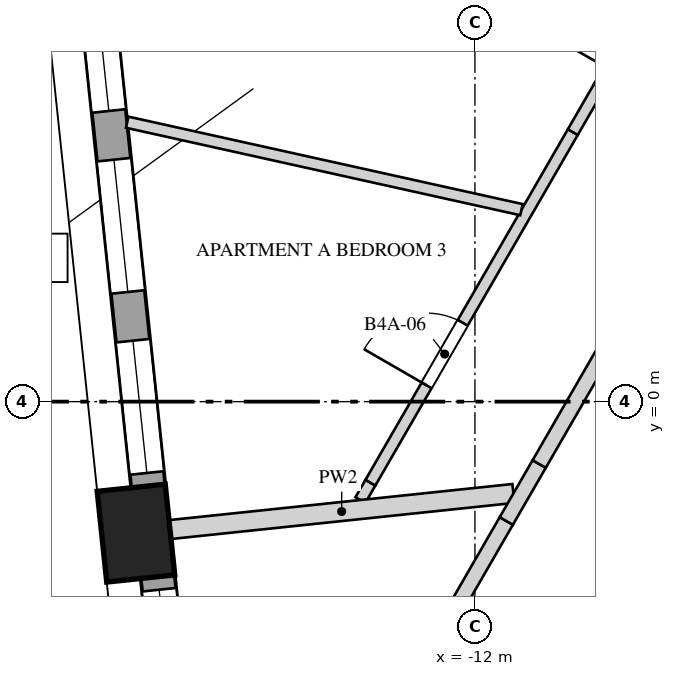
"""IFC4 building model, lengths in metres.
Left out: names, types, materials, properties, quantities, classifications, styles, units other than length and angle.
Written with IfcOpenShell. Run it as: python <this file> out.ifc"""

import sys

from ifc_helpers import new_model, si_unit, direction, frame, frame_2d, origin, origin_2d, place, context, subcontext, project, spatial, rectangle, extrude, element, fill, save


model = new_model("IFC4")
c1 = context("Model", 3, precision=1e-05, world=origin(), true_north=direction((0.0, 1.0)))
c2 = subcontext(c1, "Body", "Model", "MODEL_VIEW")
j1 = project(units=[si_unit("LENGTHUNIT", "METRE"), si_unit("PLANEANGLEUNIT", "RADIAN")], contexts=[c1])
p1 = place(None, origin())
s1 = spatial("IfcSite", under=j1, at=p1, CompositionType="ELEMENT")
p2 = place(p1, origin())
s2 = spatial("IfcBuilding", under=s1, at=p2, CompositionType="ELEMENT")
p3 = place(p2, frame((0.0, 0.0, 162.8)))
s3 = spatial("IfcBuildingStorey", under=s2, at=p3, CompositionType="ELEMENT", Elevation=162.8)
p4 = place(p3, frame((-16.459, -1.73, -0.35), z_axis=(0.0, 0.0, 1.0), x_axis=(0.104528463268, -0.994521895368, 0.0)))
e1 = element("IfcColumn", 1, at=p4, inside=s3, PredefinedType="COLUMN", context=c2, shape_type="SweptSolid", body=[
    extrude(rectangle(XDim=1.2, YDim=0.9, at=origin_2d()), origin(), (0.0, 0.0, 1.0), 4.35),
])
p5 = place(p3, frame((-17.018, 5.736, 0.0), z_axis=(0.0, 0.0, 1.0), x_axis=(0.104531531326, -0.994521572898, 0.0)))
e2 = element("IfcWall", 2, at=p5, inside=s3, PredefinedType="SOLIDWALL", context=c2, shape_type="SweptSolid", body=[
    extrude(rectangle(XDim=6.883, YDim=0.45, at=frame_2d((3.441, 0.0))), origin(), (0.0, 0.0, 1.0), 3.3),
])
p6 = place(p5, frame((0.172, 0.0, 0.5)))
e3 = element("IfcOpeningElement", 3, at=p6, cuts=e2, PredefinedType="OPENING", context=c2, shape_type="SweptSolid", body=[
    extrude(rectangle(XDim=1.75, YDim=2.65, at=frame_2d((0.875, 1.325))), frame((0.0, 0.235, 0.0), z_axis=(0.0, -1.0, 0.0), x_axis=(1.0, 0.0, 0.0)), (0.0, 0.0, 1.0), 0.47),
])
p7 = place(p5, frame((2.566, 0.0, 0.5)))
e4 = element("IfcOpeningElement", 4, at=p7, cuts=e2, PredefinedType="OPENING", context=c2, shape_type="SweptSolid", body=[
    extrude(rectangle(XDim=1.75, YDim=2.65, at=frame_2d((0.875, 1.325))), frame((0.0, 0.235, 0.0), z_axis=(0.0, -1.0, 0.0), x_axis=(1.0, 0.0, 0.0)), (0.0, 0.0, 1.0), 0.47),
])
p8 = place(p5, frame((4.961, 0.0, 0.5)))
e5 = element("IfcOpeningElement", 5, at=p8, cuts=e2, PredefinedType="OPENING", context=c2, shape_type="SweptSolid", body=[
    extrude(rectangle(XDim=1.75, YDim=2.65, at=frame_2d((0.875, 1.325))), frame((0.0, 0.235, 0.0), z_axis=(0.0, -1.0, 0.0), x_axis=(1.0, 0.0, 0.0)), (0.0, 0.0, 1.0), 0.47),
])
p9 = place(p3, frame((-16.173, -2.303, 0.0), z_axis=(0.0, 0.0, 1.0), x_axis=(0.104569484464, -0.994517583011, 0.0)))
e6 = element("IfcWall", 6, at=p9, inside=s3, PredefinedType="SOLIDWALL", context=c2, shape_type="SweptSolid", body=[
    extrude(rectangle(XDim=2.094, YDim=0.45, at=frame_2d((1.047, 0.0))), origin(), (0.0, 0.0, 1.0), 3.3),
])
p10 = place(p9, frame((0.172, 0.0, 0.5)))
e7 = element("IfcOpeningElement", 7, at=p10, cuts=e6, PredefinedType="OPENING", context=c2, shape_type="SweptSolid", body=[
    extrude(rectangle(XDim=1.75, YDim=2.65, at=frame_2d((0.875, 1.325))), frame((0.0, 0.235, 0.0), z_axis=(0.0, -1.0, 0.0), x_axis=(1.0, 0.0, 0.0)), (0.0, 0.0, 1.0), 0.47),
])
p11 = place(p3, frame((-13.506, -1.294, 0.0), z_axis=(0.0, 0.0, 1.0), x_axis=(0.499239477509, 0.866464046627, 0.0)))
e8 = element("IfcWall", 8, at=p11, inside=s3, PredefinedType="PARTITIONING", context=c2, shape_type="SweptSolid", body=[
    extrude(rectangle(XDim=0.263, YDim=0.15, at=frame_2d((0.131, 0.0))), origin(), (0.0, 0.0, 1.0), 2.95),
])
p12 = place(p3, frame((-13.375, -1.066, 0.0), z_axis=(0.0, 0.0, 1.0), x_axis=(0.500004172341, 0.866022994869, 0.0)))
e9 = element("IfcWall", 9, at=p12, inside=s3, PredefinedType="PARTITIONING", context=c2, shape_type="SweptSolid", body=[
    extrude(rectangle(XDim=5.326, YDim=0.15, at=frame_2d((2.663, 0.0))), origin(), (0.0, 0.0, 1.0), 3.65),
])
p13 = place(p12, frame((1.479, 0.0, 0.0)))
e10 = element("IfcOpeningElement", 10, at=p13, cuts=e9, PredefinedType="OPENING", context=c2, shape_type="SweptSolid", body=[
    extrude(rectangle(XDim=0.95, YDim=2.4, at=frame_2d((0.475, 1.2))), frame((0.0, 0.085, 0.0), z_axis=(0.0, -1.0, 0.0), x_axis=(1.0, 0.0, 0.0)), (0.0, 0.0, 1.0), 0.17),
])
p14 = place(p3, frame((-10.712, 3.546, 0.0), z_axis=(0.0, 0.0, 1.0), x_axis=(0.50012328804, 0.865954211699, 0.0)))
e11 = element("IfcWall", 11, at=p14, inside=s3, PredefinedType="PARTITIONING", context=c2, shape_type="SweptSolid", body=[
    extrude(rectangle(XDim=0.685, YDim=0.15, at=frame_2d((0.343, 0.0))), origin(), (0.0, 0.0, 1.0), 2.95),
])
p15 = place(p3, frame((-10.369, 4.14, 0.0), z_axis=(0.0, 0.0, 1.0), x_axis=(0.50000932403, 0.866020020486, 0.0)))
e12 = element("IfcWall", 12, at=p15, inside=s3, PredefinedType="PARTITIONING", context=c2, shape_type="SweptSolid", body=[
    extrude(rectangle(XDim=2.775, YDim=0.15, at=frame_2d((1.387, 0.0))), origin(), (0.0, 0.0, 1.0), 3.65),
])
p16 = place(p15, frame((0.27, 0.0, 0.0)))
e13 = element("IfcOpeningElement", 13, at=p16, cuts=e12, PredefinedType="OPENING", context=c2, shape_type="SweptSolid", body=[
    extrude(rectangle(XDim=0.95, YDim=2.4, at=frame_2d((0.475, 1.2))), frame((0.0, 0.085, 0.0), z_axis=(0.0, -1.0, 0.0), x_axis=(1.0, 0.0, 0.0)), (0.0, 0.0, 1.0), 0.17),
])
p17 = place(p3, frame((-11.494, -1.208, 0.0), z_axis=(0.0, 0.0, 1.0), x_axis=(-0.99452163766, -0.104530915171, 0.0)))
e14 = element("IfcWall", 14, at=p17, inside=s3, PredefinedType="SOLIDWALL", context=c2, shape_type="SweptSolid", body=[
    extrude(rectangle(XDim=4.543, YDim=0.25, at=frame_2d((2.271, 0.0))), origin(), (0.0, 0.0, 1.0), 2.95),
])
p18 = place(p3, frame((-11.388, 2.526, 0.0), z_axis=(0.0, 0.0, 1.0), x_axis=(-0.976268081413, 0.216565540229, 0.0)))
e15 = element("IfcWall", 15, at=p18, inside=s3, PredefinedType="PARTITIONING", context=c2, shape_type="SweptSolid", body=[
    extrude(rectangle(XDim=5.313, YDim=0.15, at=frame_2d((2.656, 0.0))), origin(), (0.0, 0.0, 1.0), 3.65),
])
p19 = place(p3, frame((-12.987, -3.993, 0.0), z_axis=(0.0, 0.0, 1.0), x_axis=(0.499976698542, 0.86603885647, 0.0)))
e16 = element("IfcWall", 16, at=p19, inside=s3, PredefinedType="SOLIDWALL", context=c2, shape_type="SweptSolid", body=[
    extrude(rectangle(XDim=2.799, YDim=0.2, at=frame_2d((1.399, 0.0))), origin(), (0.0, 0.0, 1.0), 3.65),
])
p20 = place(p3, frame((-11.587, -1.57, 0.0), z_axis=(0.0, 0.0, 1.0), x_axis=(0.500023708017, 0.866011715522, 0.0)))
e17 = element("IfcWall", 17, at=p20, inside=s3, PredefinedType="SOLIDWALL", context=c2, shape_type="SweptSolid", body=[
    extrude(rectangle(XDim=0.865, YDim=0.2, at=frame_2d((0.433, 0.0))), origin(), (0.0, 0.0, 1.0), 2.95),
])
p21 = place(p3, frame((-11.155, -0.821, 0.0), z_axis=(0.0, 0.0, 1.0), x_axis=(0.499992344383, 0.866029823712, 0.0)))
e18 = element("IfcWall", 18, at=p21, inside=s3, PredefinedType="SOLIDWALL", context=c2, shape_type="SweptSolid", body=[
    extrude(rectangle(XDim=4.307, YDim=0.2, at=frame_2d((2.153, 0.0))), origin(), (0.0, 0.0, 1.0), 3.65),
])
p22 = place(p6, origin())
e19 = element("IfcWindow", 19, at=p22, inside=s3, PartitioningType="SINGLE_PANEL", PredefinedType="WINDOW", context=c2, shape_type="SweptSolid", body=[
    extrude(rectangle(XDim=1.75, YDim=2.65, at=frame_2d((0.875, 1.325))), frame((0.0, 0.03, 0.0), z_axis=(0.0, -1.0, 0.0), x_axis=(1.0, 0.0, 0.0)), (0.0, 0.0, 1.0), 0.06),
])
fill(e3, e19)
p23 = place(p7, origin())
e20 = element("IfcWindow", 20, at=p23, inside=s3, PartitioningType="SINGLE_PANEL", PredefinedType="WINDOW", context=c2, shape_type="SweptSolid", body=[
    extrude(rectangle(XDim=1.75, YDim=2.65, at=frame_2d((0.875, 1.325))), frame((0.0, 0.03, 0.0), z_axis=(0.0, -1.0, 0.0), x_axis=(1.0, 0.0, 0.0)), (0.0, 0.0, 1.0), 0.06),
])
fill(e4, e20)
p24 = place(p8, origin())
e21 = element("IfcWindow", 21, at=p24, inside=s3, PartitioningType="SINGLE_PANEL", PredefinedType="WINDOW", context=c2, shape_type="SweptSolid", body=[
    extrude(rectangle(XDim=1.75, YDim=2.65, at=frame_2d((0.875, 1.325))), frame((0.0, 0.03, 0.0), z_axis=(0.0, -1.0, 0.0), x_axis=(1.0, 0.0, 0.0)), (0.0, 0.0, 1.0), 0.06),
])
fill(e5, e21)
p25 = place(p10, origin())
e22 = element("IfcWindow", 22, at=p25, inside=s3, PartitioningType="SINGLE_PANEL", PredefinedType="WINDOW", context=c2, shape_type="SweptSolid", body=[
    extrude(rectangle(XDim=1.75, YDim=2.65, at=frame_2d((0.875, 1.325))), frame((0.0, 0.03, 0.0), z_axis=(0.0, -1.0, 0.0), x_axis=(1.0, 0.0, 0.0)), (0.0, 0.0, 1.0), 0.06),
])
fill(e7, e22)
p26 = place(p13, origin())
e23 = element("IfcDoor", 23, at=p26, inside=s3, OperationType="SINGLE_SWING_RIGHT", PredefinedType="DOOR", context=c2, shape_type="SweptSolid", body=[
    extrude(rectangle(XDim=0.95, YDim=2.4, at=frame_2d((0.475, 1.2))), frame((0.0, 0.025, 0.0), z_axis=(0.0, -1.0, 0.0), x_axis=(1.0, 0.0, 0.0)), (0.0, 0.0, 1.0), 0.05),
])
fill(e10, e23)
save(model, sys.argv[1])
